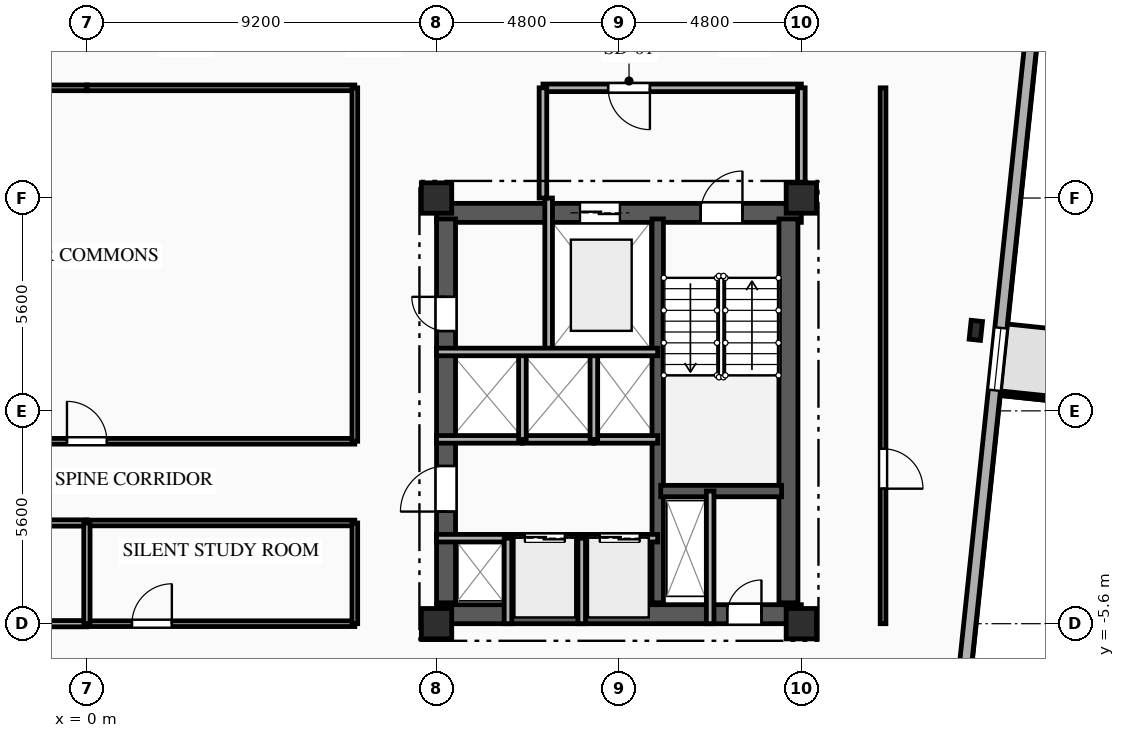
"""IFC4 building model, lengths in metres.
Left out: names, types, materials, properties, quantities, classifications, styles, units other than length and angle.
Written with IfcOpenShell. Run it as: python <this file> out.ifc"""

import sys

from ifc_helpers import new_model, si_unit, direction, frame, frame_2d, origin, origin_2d, place, context, subcontext, project, spatial, rectangle, i_section, extrude, element, fill, save


model = new_model("IFC4")
c1 = context("Model", 3, precision=1e-05, world=origin(), true_north=direction((0.0, 1.0)))
c2 = subcontext(c1, "Body", "Model", "MODEL_VIEW")
j1 = project(units=[si_unit("LENGTHUNIT", "METRE"), si_unit("PLANEANGLEUNIT", "RADIAN")], contexts=[c1])
p1 = place(None, origin())
s1 = spatial("IfcSite", under=j1, at=p1, CompositionType="ELEMENT")
p2 = place(p1, origin())
s2 = spatial("IfcBuilding", under=s1, at=p2, CompositionType="ELEMENT")
p3 = place(p2, frame((0.0, 0.0, 189.7)))
s3 = spatial("IfcBuildingStorey", under=s2, at=p3, CompositionType="ELEMENT", Elevation=189.7)
for number, where, z_axis, x_axis in (
    (1, (9.2, -5.6, 0.0), (0.0, 0.0, 1.0), (1.0, 0.0, 0.0)),
    (2, (9.2, 5.6, 0.0), (0.0, 0.0, 1.0), (1.0, 0.0, 0.0)),
    (3, (18.8, -5.6, 0.0), (0.0, 0.0, 1.0), (1.0, 0.0, 0.0)),
    (4, (18.8, 5.6, 0.0), (0.0, 0.0, 1.0), (1.0, 0.0, 0.0)),
):
    element("IfcColumn", number, at=place(p3, frame(where, z_axis=z_axis, x_axis=x_axis)), inside=s3, PredefinedType="COLUMN", context=c2, shape_type="SweptSolid", body=[
        extrude(rectangle(XDim=0.8, YDim=0.8, at=origin_2d()), origin(), (0.0, 0.0, 1.0), 3.35),
    ])
p4 = place(p3, frame((23.391, 2.119, 0.0), z_axis=(0.0, 0.0, 1.0), x_axis=(0.994521895368, -0.104528463268, 0.0)))
e5 = element("IfcColumn", 5, at=p4, inside=s3, PredefinedType="COLUMN", context=c2, shape_type="SweptSolid", body=[
    extrude(i_section(OverallWidth=0.3, OverallDepth=0.5, WebThickness=0.014, FlangeThickness=0.028, FilletRadius=0.027, at=origin_2d()), origin(), (0.0, 0.0, 1.0), 3.35),
])
p5 = place(p3, frame((25.063, 11.814, 0.0), z_axis=(0.0, 0.0, 1.0), x_axis=(-0.104523275986, -0.99452244056, 0.0)))
e6 = element("IfcWall", 6, at=p5, inside=s3, PredefinedType="SOLIDWALL", context=c2, shape_type="SweptSolid", body=[
    extrude(rectangle(XDim=28.8, YDim=0.32, at=frame_2d((14.4, 0.0))), origin(), (0.0, 0.0, 1.0), 3.04),
])
p6 = place(p5, frame((9.684, 0.0, 0.85)))
e7 = element("IfcOpeningElement", 7, at=p6, cuts=e6, PredefinedType="OPENING", context=c2, shape_type="SweptSolid", body=[
    extrude(rectangle(XDim=1.65, YDim=1.85, at=frame_2d((0.825, 0.925))), frame((0.0, 0.17, 0.0), z_axis=(0.0, -1.0, 0.0), x_axis=(1.0, 0.0, 0.0)), (0.0, 0.0, 1.0), 0.34),
])
p7 = place(p3, frame((9.2, 5.21, 0.0), z_axis=(0.0, 0.0, 1.0), x_axis=(1.0, 0.0, 0.0)))
e8 = element("IfcWall", 8, at=p7, inside=s3, PredefinedType="SHEAR", context=c2, shape_type="SweptSolid", body=[
    extrude(rectangle(XDim=9.6, YDim=0.5, at=frame_2d((4.8, 0.0))), origin(), (0.0, 0.0, 1.0), 3.04),
])
p8 = place(p7, frame((6.95, 0.0, 0.0)))
e9 = element("IfcOpeningElement", 9, at=p8, cuts=e8, PredefinedType="OPENING", context=c2, shape_type="SweptSolid", body=[
    extrude(rectangle(XDim=1.1, YDim=2.15, at=frame_2d((0.55, 1.075))), frame((0.0, 0.26, 0.0), z_axis=(0.0, -1.0, 0.0), x_axis=(1.0, 0.0, 0.0)), (0.0, 0.0, 1.0), 0.52),
])
p9 = place(p7, frame((3.775, 0.0, 0.0)))
e10 = element("IfcOpeningElement", 10, at=p9, cuts=e8, PredefinedType="OPENING", context=c2, shape_type="SweptSolid", body=[
    extrude(rectangle(XDim=1.05, YDim=2.1, at=frame_2d((0.525, 1.05))), frame((0.0, 0.26, 0.0), z_axis=(0.0, -1.0, 0.0), x_axis=(1.0, 0.0, 0.0)), (0.0, 0.0, 1.0), 0.52),
])
p10 = place(p3, frame((9.2, -5.35, 0.0), z_axis=(0.0, 0.0, 1.0), x_axis=(1.0, 0.0, 0.0)))
e11 = element("IfcWall", 11, at=p10, inside=s3, PredefinedType="SHEAR", context=c2, shape_type="SweptSolid", body=[
    extrude(rectangle(XDim=9.6, YDim=0.5, at=frame_2d((4.8, 0.0))), origin(), (0.0, 0.0, 1.0), 3.04),
])
p11 = place(p10, frame((7.65, 0.0, 0.0)))
e12 = element("IfcOpeningElement", 12, at=p11, cuts=e11, PredefinedType="OPENING", context=c2, shape_type="SweptSolid", body=[
    extrude(rectangle(XDim=0.9, YDim=2.1, at=frame_2d((0.45, 1.05))), frame((0.0, 0.26, 0.0), z_axis=(0.0, -1.0, 0.0), x_axis=(1.0, 0.0, 0.0)), (0.0, 0.0, 1.0), 0.52),
])
p12 = place(p3, frame((9.45, -5.05, 0.0), z_axis=(0.0, 0.0, 1.0), x_axis=(0.0, 1.0, 0.0)))
e13 = element("IfcWall", 13, at=p12, inside=s3, PredefinedType="SHEAR", context=c2, shape_type="SweptSolid", body=[
    extrude(rectangle(XDim=10.1, YDim=0.5, at=frame_2d((5.05, 0.0))), origin(), (0.0, 0.0, 1.0), 3.04),
])
p13 = place(p12, frame((7.15, 0.0, 0.0)))
e14 = element("IfcOpeningElement", 14, at=p13, cuts=e13, PredefinedType="OPENING", context=c2, shape_type="SweptSolid", body=[
    extrude(rectangle(XDim=0.9, YDim=2.1, at=frame_2d((0.45, 1.05))), frame((0.0, 0.26, 0.0), z_axis=(0.0, -1.0, 0.0), x_axis=(1.0, 0.0, 0.0)), (0.0, 0.0, 1.0), 0.52),
])
p14 = place(p12, frame((2.4, 0.0, 0.0)))
e15 = element("IfcOpeningElement", 15, at=p14, cuts=e13, PredefinedType="OPENING", context=c2, shape_type="SweptSolid", body=[
    extrude(rectangle(XDim=1.2, YDim=2.15, at=frame_2d((0.6, 1.075))), frame((0.0, 0.26, 0.0), z_axis=(0.0, -1.0, 0.0), x_axis=(1.0, 0.0, 0.0)), (0.0, 0.0, 1.0), 0.52),
])
p15 = place(p3, frame((18.46, -5.05, 0.0), z_axis=(0.0, 0.0, 1.0), x_axis=(0.0, 1.0, 0.0)))
e16 = element("IfcWall", 16, at=p15, inside=s3, PredefinedType="SHEAR", context=c2, shape_type="SweptSolid", body=[
    extrude(rectangle(XDim=10.1, YDim=0.5, at=frame_2d((5.05, 0.0))), origin(), (0.0, 0.0, 1.0), 3.04),
])
p16 = place(p3, frame((15.02, -5.05, 0.0), z_axis=(0.0, 0.0, 1.0), x_axis=(0.0, 1.0, 0.0)))
e17 = element("IfcWall", 17, at=p16, inside=s3, PredefinedType="SHEAR", context=c2, shape_type="SweptSolid", body=[
    extrude(rectangle(XDim=10.1, YDim=0.3, at=frame_2d((5.05, 0.0))), origin(), (0.0, 0.0, 1.0), 3.04),
])
p17 = place(p3, frame((15.1, -2.11, 0.0), z_axis=(0.0, 0.0, 1.0), x_axis=(1.0, 0.0, 0.0)))
e18 = element("IfcWall", 18, at=p17, inside=s3, PredefinedType="SHEAR", context=c2, shape_type="SweptSolid", body=[
    extrude(rectangle(XDim=3.18, YDim=0.3, at=frame_2d((1.59, 0.0))), origin(), (0.0, 0.0, 1.0), 3.04),
])
p18 = place(p3, frame((16.4, -2.11, 0.0), z_axis=(0.0, 0.0, 1.0), x_axis=(0.0, -1.0, 0.0)))
e19 = element("IfcWall", 19, at=p18, inside=s3, PredefinedType="PARTITIONING", context=c2, shape_type="SweptSolid", body=[
    extrude(rectangle(XDim=3.49, YDim=0.2, at=frame_2d((1.745, 0.0))), origin(), (0.0, 0.0, 1.0), 3.04),
])
p19 = place(p3, frame((12.15, 5.6, 0.0), z_axis=(0.0, 0.0, 1.0), x_axis=(0.0, -1.0, 0.0)))
e20 = element("IfcWall", 20, at=p19, inside=s3, PredefinedType="PARTITIONING", context=c2, shape_type="SweptSolid", body=[
    extrude(rectangle(XDim=4.05, YDim=0.2, at=frame_2d((2.025, 0.0))), origin(), (0.0, 0.0, 1.0), 3.04),
])
p20 = place(p3, frame((18.8, 8.5, 0.0), z_axis=(0.0, 0.0, 1.0), x_axis=(-1.0, 0.0, 0.0)))
e21 = element("IfcWall", 21, at=p20, inside=s3, PredefinedType="PARTITIONING", context=c2, shape_type="SweptSolid", body=[
    extrude(rectangle(XDim=6.8, YDim=0.2, at=frame_2d((3.4, 0.0))), origin(), (0.0, 0.0, 1.0), 3.04),
])
p21 = place(p20, frame((3.985, 0.0, 0.0)))
e22 = element("IfcOpeningElement", 22, at=p21, cuts=e21, PredefinedType="OPENING", context=c2, shape_type="SweptSolid", body=[
    extrude(rectangle(XDim=1.1, YDim=2.15, at=frame_2d((0.55, 1.075))), frame((0.0, 0.11, 0.0), z_axis=(0.0, -1.0, 0.0), x_axis=(1.0, 0.0, 0.0)), (0.0, 0.0, 1.0), 0.22),
])
p22 = place(p3, frame((18.8, 5.6, 0.0), z_axis=(0.0, 0.0, 1.0), x_axis=(0.0, 1.0, 0.0)))
e23 = element("IfcWall", 23, at=p22, inside=s3, PredefinedType="PARTITIONING", context=c2, shape_type="SweptSolid", body=[
    extrude(rectangle(XDim=2.9, YDim=0.2, at=frame_2d((1.45, 0.0))), origin(), (0.0, 0.0, 1.0), 2.665),
])
p23 = place(p3, frame((12.0, 8.5, 0.0), z_axis=(0.0, 0.0, 1.0), x_axis=(0.0, -1.0, 0.0)))
e24 = element("IfcWall", 24, at=p23, inside=s3, PredefinedType="PARTITIONING", context=c2, shape_type="SweptSolid", body=[
    extrude(rectangle(XDim=2.9, YDim=0.2, at=frame_2d((1.45, 0.0))), origin(), (0.0, 0.0, 1.0), 3.04),
])
p24 = place(p3, frame((9.2, -3.35, 0.0), z_axis=(0.0, 0.0, 1.0), x_axis=(1.0, 0.0, 0.0)))
e25 = element("IfcWall", 25, at=p24, inside=s3, PredefinedType="PARTITIONING", context=c2, shape_type="SweptSolid", body=[
    extrude(rectangle(XDim=1.88, YDim=0.2, at=frame_2d((0.94, 0.0))), origin(), (0.0, 0.0, 1.0), 2.755),
])
p25 = place(p3, frame((11.08, -3.35, 0.0), z_axis=(0.0, 0.0, 1.0), x_axis=(1.0, 0.0, 0.0)))
e26 = element("IfcWall", 26, at=p25, inside=s3, PredefinedType="PARTITIONING", context=c2, shape_type="SweptSolid", body=[
    extrude(rectangle(XDim=1.94, YDim=0.2, at=frame_2d((0.97, 0.0))), origin(), (0.0, 0.0, 1.0), 3.04),
])
p26 = place(p25, frame((0.445, 0.0, 0.0)))
e27 = element("IfcOpeningElement", 27, at=p26, cuts=e26, PredefinedType="OPENING", context=c2, shape_type="SweptSolid", body=[
    extrude(rectangle(XDim=1.05, YDim=2.1, at=frame_2d((0.525, 1.05))), frame((0.0, 0.11, 0.0), z_axis=(0.0, -1.0, 0.0), x_axis=(1.0, 0.0, 0.0)), (0.0, 0.0, 1.0), 0.22),
])
p27 = place(p3, frame((13.02, -3.35, 0.0), z_axis=(0.0, 0.0, 1.0), x_axis=(1.0, 0.0, 0.0)))
e28 = element("IfcWall", 28, at=p27, inside=s3, PredefinedType="PARTITIONING", context=c2, shape_type="SweptSolid", body=[
    extrude(rectangle(XDim=2.0, YDim=0.2, at=frame_2d((1.0, 0.0))), origin(), (0.0, 0.0, 1.0), 3.04),
])
p28 = place(p27, frame((0.475, 0.0, 0.0)))
e29 = element("IfcOpeningElement", 29, at=p28, cuts=e28, PredefinedType="OPENING", context=c2, shape_type="SweptSolid", body=[
    extrude(rectangle(XDim=1.05, YDim=2.1, at=frame_2d((0.525, 1.05))), frame((0.0, 0.11, 0.0), z_axis=(0.0, -1.0, 0.0), x_axis=(1.0, 0.0, 0.0)), (0.0, 0.0, 1.0), 0.22),
])
p29 = place(p3, frame((11.46, -0.75, 0.0), z_axis=(0.0, 0.0, 1.0), x_axis=(-1.0, 0.0, 0.0)))
e30 = element("IfcWall", 30, at=p29, inside=s3, PredefinedType="PARTITIONING", context=c2, shape_type="SweptSolid", body=[
    extrude(rectangle(XDim=2.26, YDim=0.2, at=frame_2d((1.13, 0.0))), origin(), (0.0, 0.0, 1.0), 3.04),
])
p30 = place(p3, frame((13.34, -0.75, 0.0), z_axis=(0.0, 0.0, 1.0), x_axis=(-1.0, 0.0, 0.0)))
e31 = element("IfcWall", 31, at=p30, inside=s3, PredefinedType="PARTITIONING", context=c2, shape_type="SweptSolid", body=[
    extrude(rectangle(XDim=1.88, YDim=0.2, at=frame_2d((0.94, 0.0))), origin(), (0.0, 0.0, 1.0), 3.04),
])
p31 = place(p3, frame((15.02, -0.75, 0.0), z_axis=(0.0, 0.0, 1.0), x_axis=(-1.0, 0.0, 0.0)))
e32 = element("IfcWall", 32, at=p31, inside=s3, PredefinedType="PARTITIONING", context=c2, shape_type="SweptSolid", body=[
    extrude(rectangle(XDim=1.68, YDim=0.2, at=frame_2d((0.84, 0.0))), origin(), (0.0, 0.0, 1.0), 3.04),
])
for number, where, z_axis, x_axis in (
    (33, (11.08, -5.6, 0.0), (0.0, 0.0, 1.0), (0.0, 1.0, 0.0)),
    (34, (13.02, -5.6, 0.0), (0.0, 0.0, 1.0), (0.0, 1.0, 0.0)),
):
    element("IfcWall", number, at=place(p3, frame(where, z_axis=z_axis, x_axis=x_axis)), inside=s3, PredefinedType="PARTITIONING", context=c2, shape_type="SweptSolid", body=[
        extrude(rectangle(XDim=2.25, YDim=0.2, at=frame_2d((1.125, 0.0))), origin(), (0.0, 0.0, 1.0), 3.04),
    ])
for number, where, z_axis, x_axis in (
    (35, (11.46, -0.75, 0.0), (0.0, 0.0, 1.0), (0.0, 1.0, 0.0)),
    (36, (13.34, -0.75, 0.0), (0.0, 0.0, 1.0), (0.0, 1.0, 0.0)),
):
    element("IfcWall", number, at=place(p3, frame(where, z_axis=z_axis, x_axis=x_axis)), inside=s3, PredefinedType="PARTITIONING", context=c2, shape_type="SweptSolid", body=[
        extrude(rectangle(XDim=2.3, YDim=0.2, at=frame_2d((1.15, 0.0))), origin(), (0.0, 0.0, 1.0), 3.04),
    ])
for number, where, z_axis, x_axis in (
    (37, (0.0, 8.5, 0.0), (0.0, 0.0, 1.0), (-1.0, 0.0, 0.0)),
    (38, (7.05, 8.5, 0.0), (0.0, 0.0, 1.0), (-1.0, 0.0, 0.0)),
):
    element("IfcWall", number, at=place(p3, frame(where, z_axis=z_axis, x_axis=x_axis)), inside=s3, PredefinedType="PARTITIONING", context=c2, shape_type="SweptSolid", body=[
        extrude(rectangle(XDim=7.05, YDim=0.15, at=frame_2d((3.525, 0.0))), origin(), (0.0, 0.0, 1.0), 3.04),
    ])
p32 = place(p3, frame((-7.05, -5.6, 0.0), z_axis=(0.0, 0.0, 1.0), x_axis=(1.0, 0.0, 0.0)))
e39 = element("IfcWall", 39, at=p32, inside=s3, PredefinedType="PARTITIONING", context=c2, shape_type="SweptSolid", body=[
    extrude(rectangle(XDim=7.05, YDim=0.165, at=frame_2d((3.525, 0.0))), origin(), (0.0, 0.0, 1.0), 2.525),
])
p33 = place(p32, frame((4.728, 0.0, 0.0)))
e40 = element("IfcOpeningElement", 40, at=p33, cuts=e39, PredefinedType="OPENING", context=c2, shape_type="SweptSolid", body=[
    extrude(rectangle(XDim=1.15, YDim=2.15, at=frame_2d((0.575, 1.075))), frame((0.0, 0.093, 0.0), z_axis=(0.0, -1.0, 0.0), x_axis=(1.0, 0.0, 0.0)), (0.0, 0.0, 1.0), 0.185),
])
p34 = place(p3, frame((0.0, -5.6, 0.0), z_axis=(0.0, 0.0, 1.0), x_axis=(1.0, 0.0, 0.0)))
e41 = element("IfcWall", 41, at=p34, inside=s3, PredefinedType="PARTITIONING", context=c2, shape_type="SweptSolid", body=[
    extrude(rectangle(XDim=7.05, YDim=0.15, at=frame_2d((3.525, 0.0))), origin(), (0.0, 0.0, 1.0), 2.525),
])
p35 = place(p34, frame((1.185, 0.0, 0.0)))
e42 = element("IfcOpeningElement", 42, at=p35, cuts=e41, PredefinedType="OPENING", context=c2, shape_type="SweptSolid", body=[
    extrude(rectangle(XDim=1.05, YDim=2.15, at=frame_2d((0.525, 1.075))), frame((0.0, 0.085, 0.0), z_axis=(0.0, -1.0, 0.0), x_axis=(1.0, 0.0, 0.0)), (0.0, 0.0, 1.0), 0.17),
])
p36 = place(p3, frame((20.95, 8.5, 0.0), z_axis=(0.0, 0.0, 1.0), x_axis=(0.0, -1.0, 0.0)))
e43 = element("IfcWall", 43, at=p36, inside=s3, PredefinedType="PARTITIONING", context=c2, shape_type="SweptSolid", body=[
    extrude(rectangle(XDim=14.1, YDim=0.15, at=frame_2d((7.05, 0.0))), origin(), (0.0, 0.0, 1.0), 2.695),
])
p37 = place(p36, frame((9.498, 0.0, 0.0)))
e44 = element("IfcOpeningElement", 44, at=p37, cuts=e43, PredefinedType="OPENING", context=c2, shape_type="SweptSolid", body=[
    extrude(rectangle(XDim=1.05, YDim=2.15, at=frame_2d((0.525, 1.075))), frame((0.0, 0.085, 0.0), z_axis=(0.0, -1.0, 0.0), x_axis=(1.0, 0.0, 0.0)), (0.0, 0.0, 1.0), 0.17),
])
p38 = place(p3, frame((-7.05, -0.8, 0.0), z_axis=(0.0, 0.0, 1.0), x_axis=(1.0, 0.0, 0.0)))
e45 = element("IfcWall", 45, at=p38, inside=s3, PredefinedType="PARTITIONING", context=c2, shape_type="SweptSolid", body=[
    extrude(rectangle(XDim=14.1, YDim=0.15, at=frame_2d((7.05, 0.0))), origin(), (0.0, 0.0, 1.0), 3.04),
])
p39 = place(p38, frame((6.525, 0.0, 0.0)))
e46 = element("IfcOpeningElement", 46, at=p39, cuts=e45, PredefinedType="OPENING", context=c2, shape_type="SweptSolid", body=[
    extrude(rectangle(XDim=1.05, YDim=2.15, at=frame_2d((0.525, 1.075))), frame((0.0, 0.085, 0.0), z_axis=(0.0, -1.0, 0.0), x_axis=(1.0, 0.0, 0.0)), (0.0, 0.0, 1.0), 0.17),
])
p40 = place(p3, frame((0.0, -2.95, 0.0), z_axis=(0.0, 0.0, 1.0), x_axis=(-1.0, 0.0, 0.0)))
e47 = element("IfcWall", 47, at=p40, inside=s3, PredefinedType="PARTITIONING", context=c2, shape_type="SweptSolid", body=[
    extrude(rectangle(XDim=7.05, YDim=0.165, at=frame_2d((3.525, 0.0))), origin(), (0.0, 0.0, 1.0), 3.04),
])
p41 = place(p3, frame((7.05, -2.95, 0.0), z_axis=(0.0, 0.0, 1.0), x_axis=(-1.0, 0.0, 0.0)))
e48 = element("IfcWall", 48, at=p41, inside=s3, PredefinedType="PARTITIONING", context=c2, shape_type="SweptSolid", body=[
    extrude(rectangle(XDim=7.05, YDim=0.15, at=frame_2d((3.525, 0.0))), origin(), (0.0, 0.0, 1.0), 3.04),
])
p42 = place(p3, frame((7.05, -0.8, 0.0), z_axis=(0.0, 0.0, 1.0), x_axis=(0.0, 1.0, 0.0)))
e49 = element("IfcWall", 49, at=p42, inside=s3, PredefinedType="PARTITIONING", context=c2, shape_type="SweptSolid", body=[
    extrude(rectangle(XDim=9.3, YDim=0.15, at=frame_2d((4.65, 0.0))), origin(), (0.0, 0.0, 1.0), 3.04),
])
p43 = place(p3, frame((7.05, -5.6, 0.0), z_axis=(0.0, 0.0, 1.0), x_axis=(0.0, 1.0, 0.0)))
e50 = element("IfcWall", 50, at=p43, inside=s3, PredefinedType="PARTITIONING", context=c2, shape_type="SweptSolid", body=[
    extrude(rectangle(XDim=2.65, YDim=0.15, at=frame_2d((1.325, 0.0))), origin(), (0.0, 0.0, 1.0), 3.04),
])
p44 = place(p3, frame((0.0, -2.95, 0.0), z_axis=(0.0, 0.0, 1.0), x_axis=(0.0, -1.0, 0.0)))
e51 = element("IfcWall", 51, at=p44, inside=s3, PredefinedType="PARTITIONING", context=c2, shape_type="SweptSolid", body=[
    extrude(rectangle(XDim=2.65, YDim=0.165, at=frame_2d((1.325, 0.0))), origin(), (0.0, 0.0, 1.0), 3.04),
])
p45 = place(p3, frame((9.2, 1.55, 0.0), z_axis=(0.0, 0.0, 1.0), x_axis=(1.0, 0.0, 0.0)))
e52 = element("IfcWall", 52, at=p45, inside=s3, PredefinedType="PARTITIONING", context=c2, shape_type="SweptSolid", body=[
    extrude(rectangle(XDim=5.82, YDim=0.2, at=frame_2d((2.91, 0.0))), origin(), (0.0, 0.0, 1.0), 3.04),
])
p46 = place(p6, origin())
e53 = element("IfcWindow", 53, at=p46, inside=s3, PartitioningType="SINGLE_PANEL", PredefinedType="WINDOW", context=c2, shape_type="SweptSolid", body=[
    extrude(rectangle(XDim=1.65, YDim=1.85, at=frame_2d((0.825, 0.925))), frame((0.0, 0.03, 0.0), z_axis=(0.0, -1.0, 0.0), x_axis=(1.0, 0.0, 0.0)), (0.0, 0.0, 1.0), 0.06),
])
fill(e7, e53)
p47 = place(p8, origin())
e54 = element("IfcDoor", 54, at=p47, inside=s3, OperationType="SINGLE_SWING_RIGHT", PredefinedType="DOOR", context=c2, shape_type="SweptSolid", body=[
    extrude(rectangle(XDim=1.1, YDim=2.15, at=frame_2d((0.55, 1.075))), frame((0.0, 0.025, 0.0), z_axis=(0.0, -1.0, 0.0), x_axis=(1.0, 0.0, 0.0)), (0.0, 0.0, 1.0), 0.05),
])
fill(e9, e54)
p48 = place(p9, origin())
e55 = element("IfcDoor", 55, at=p48, inside=s3, OperationType="DOUBLE_DOOR_SLIDING", PredefinedType="DOOR", context=c2, shape_type="SweptSolid", body=[
    extrude(rectangle(XDim=1.05, YDim=2.1, at=frame_2d((0.525, 1.05))), frame((0.0, 0.025, 0.0), z_axis=(0.0, -1.0, 0.0), x_axis=(1.0, 0.0, 0.0)), (0.0, 0.0, 1.0), 0.05),
])
fill(e10, e55)
p49 = place(p11, origin())
e56 = element("IfcDoor", 56, at=p49, inside=s3, OperationType="SINGLE_SWING_RIGHT", PredefinedType="DOOR", context=c2, shape_type="SweptSolid", body=[
    extrude(rectangle(XDim=0.9, YDim=2.1, at=frame_2d((0.45, 1.05))), frame((0.0, 0.025, 0.0), z_axis=(0.0, -1.0, 0.0), x_axis=(1.0, 0.0, 0.0)), (0.0, 0.0, 1.0), 0.05),
])
fill(e12, e56)
p50 = place(p21, origin())
e57 = element("IfcDoor", 57, at=p50, inside=s3, OperationType="SINGLE_SWING_LEFT", PredefinedType="DOOR", context=c2, shape_type="SweptSolid", body=[
    extrude(rectangle(XDim=1.1, YDim=2.15, at=frame_2d((0.55, 1.075))), frame((0.0, 0.025, 0.0), z_axis=(0.0, -1.0, 0.0), x_axis=(1.0, 0.0, 0.0)), (0.0, 0.0, 1.0), 0.05),
])
fill(e22, e57)
p51 = place(p13, origin())
e58 = element("IfcDoor", 58, at=p51, inside=s3, OperationType="SINGLE_SWING_RIGHT", PredefinedType="DOOR", context=c2, shape_type="SweptSolid", body=[
    extrude(rectangle(XDim=0.9, YDim=2.1, at=frame_2d((0.45, 1.05))), frame((0.0, 0.025, 0.0), z_axis=(0.0, -1.0, 0.0), x_axis=(1.0, 0.0, 0.0)), (0.0, 0.0, 1.0), 0.05),
])
fill(e14, e58)
p52 = place(p26, origin())
e59 = element("IfcDoor", 59, at=p52, inside=s3, OperationType="DOUBLE_DOOR_SLIDING", PredefinedType="DOOR", context=c2, shape_type="SweptSolid", body=[
    extrude(rectangle(XDim=1.05, YDim=2.1, at=frame_2d((0.525, 1.05))), frame((0.0, 0.025, 0.0), z_axis=(0.0, -1.0, 0.0), x_axis=(1.0, 0.0, 0.0)), (0.0, 0.0, 1.0), 0.05),
])
fill(e27, e59)
p53 = place(p28, origin())
e60 = element("IfcDoor", 60, at=p53, inside=s3, OperationType="DOUBLE_DOOR_SLIDING", PredefinedType="DOOR", context=c2, shape_type="SweptSolid", body=[
    extrude(rectangle(XDim=1.05, YDim=2.1, at=frame_2d((0.525, 1.05))), frame((0.0, 0.025, 0.0), z_axis=(0.0, -1.0, 0.0), x_axis=(1.0, 0.0, 0.0)), (0.0, 0.0, 1.0), 0.05),
])
fill(e29, e60)
p54 = place(p14, origin())
e61 = element("IfcDoor", 61, at=p54, inside=s3, OperationType="SINGLE_SWING_LEFT", PredefinedType="DOOR", context=c2, shape_type="SweptSolid", body=[
    extrude(rectangle(XDim=1.2, YDim=2.15, at=frame_2d((0.6, 1.075))), frame((0.0, 0.025, 0.0), z_axis=(0.0, -1.0, 0.0), x_axis=(1.0, 0.0, 0.0)), (0.0, 0.0, 1.0), 0.05),
])
fill(e15, e61)
p55 = place(p35, origin())
e62 = element("IfcDoor", 62, at=p55, inside=s3, OperationType="SINGLE_SWING_RIGHT", PredefinedType="DOOR", context=c2, shape_type="SweptSolid", body=[
    extrude(rectangle(XDim=1.05, YDim=2.15, at=frame_2d((0.525, 1.075))), frame((0.0, 0.025, 0.0), z_axis=(0.0, -1.0, 0.0), x_axis=(1.0, 0.0, 0.0)), (0.0, 0.0, 1.0), 0.05),
])
fill(e42, e62)
p56 = place(p37, origin())
e63 = element("IfcDoor", 63, at=p56, inside=s3, OperationType="SINGLE_SWING_RIGHT", PredefinedType="DOOR", context=c2, shape_type="SweptSolid", body=[
    extrude(rectangle(XDim=1.05, YDim=2.15, at=frame_2d((0.525, 1.075))), frame((0.0, 0.025, 0.0), z_axis=(0.0, -1.0, 0.0), x_axis=(1.0, 0.0, 0.0)), (0.0, 0.0, 1.0), 0.05),
])
fill(e44, e63)
p57 = place(p39, origin())
e64 = element("IfcDoor", 64, at=p57, inside=s3, OperationType="SINGLE_SWING_LEFT", PredefinedType="DOOR", context=c2, shape_type="SweptSolid", body=[
    extrude(rectangle(XDim=1.05, YDim=2.15, at=frame_2d((0.525, 1.075))), frame((0.0, 0.025, 0.0), z_axis=(0.0, -1.0, 0.0), x_axis=(1.0, 0.0, 0.0)), (0.0, 0.0, 1.0), 0.05),
])
fill(e46, e64)
save(model, sys.argv[1])
